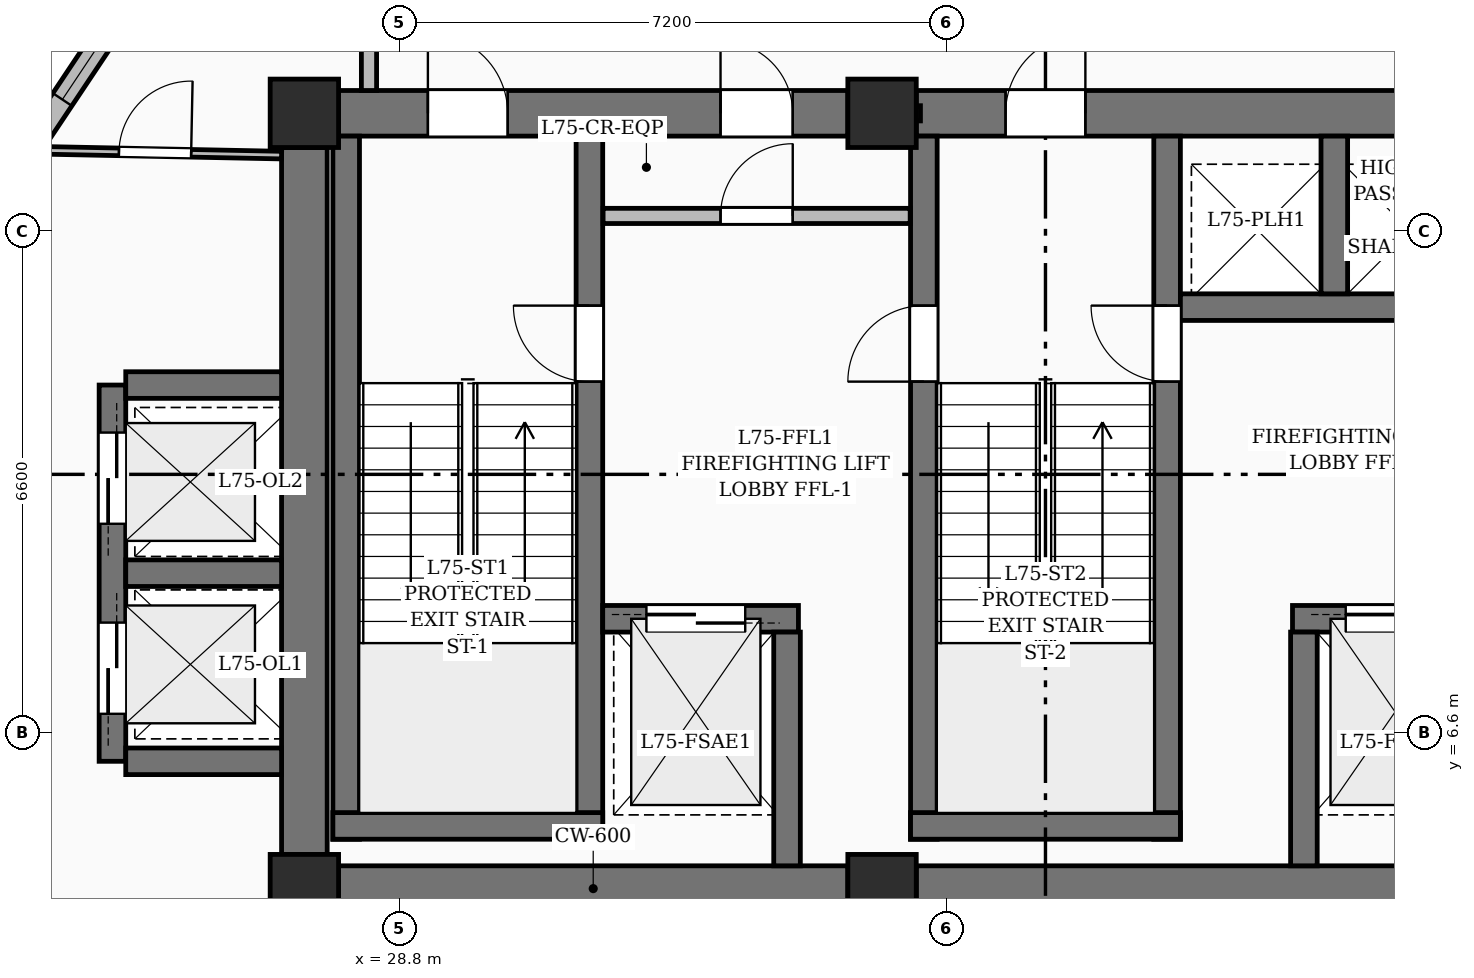
"""IFC4 building model, lengths in metres.
Left out: names, types, materials, properties, quantities, classifications, styles, units other than length and angle.
Written with IfcOpenShell. Run it as: python <this file> out.ifc"""

import sys

from ifc_helpers import new_model, si_unit, direction, frame, frame_2d, origin, origin_2d, place, context, subcontext, project, spatial, rectangle, extrude, element, fill, save


model = new_model("IFC4")
c1 = context("Model", 3, precision=1e-05, world=origin(), true_north=direction((0.0, 1.0)))
c2 = subcontext(c1, "Body", "Model", "MODEL_VIEW")
j1 = project(units=[si_unit("LENGTHUNIT", "METRE"), si_unit("PLANEANGLEUNIT", "RADIAN")], contexts=[c1])
p1 = place(None, origin())
s1 = spatial("IfcSite", under=j1, at=p1, CompositionType="ELEMENT")
p2 = place(p1, origin())
s2 = spatial("IfcBuilding", under=s1, at=p2, CompositionType="ELEMENT")
p3 = place(p2, frame((0.0, 0.0, 289.5)))
s3 = spatial("IfcBuildingStorey", under=s2, at=p3, CompositionType="ELEMENT", Elevation=289.5)
for number, where, z_axis, x_axis in (
    (1, (27.55, 4.55, 0.0), (0.0, 0.0, 1.0), (1.0, 0.0, 0.0)),
    (2, (35.15, 4.55, 0.0), (0.0, 0.0, 1.0), (1.0, 0.0, 0.0)),
    (3, (27.55, 14.75, 0.0), (0.0, 0.0, 1.0), (1.0, 0.0, 0.0)),
    (4, (35.15, 14.75, 0.0), (0.0, 0.0, 1.0), (1.0, 0.0, 0.0)),
):
    element("IfcColumn", number, at=place(p3, frame(where, z_axis=z_axis, x_axis=x_axis)), inside=s3, PredefinedType="COLUMN", context=c2, shape_type="SweptSolid", body=[
        extrude(rectangle(XDim=0.9, YDim=0.9, at=origin_2d()), origin(), (0.0, 0.0, 1.0), 4.5),
    ])
p4 = place(p3, frame((28.0, 4.55, 0.0), z_axis=(0.0, 0.0, 1.0), x_axis=(1.0, 0.0, 0.0)))
e5 = element("IfcWall", 5, at=p4, inside=s3, PredefinedType="SHEAR", context=c2, shape_type="SweptSolid", body=[
    extrude(rectangle(XDim=6.7, YDim=0.6, at=frame_2d((3.35, 0.0))), origin(), (0.0, 0.0, 1.0), 4.5),
])
p5 = place(p3, frame((35.6, 4.55, 0.0), z_axis=(0.0, 0.0, 1.0), x_axis=(1.0, 0.0, 0.0)))
e6 = element("IfcWall", 6, at=p5, inside=s3, PredefinedType="SHEAR", context=c2, shape_type="SweptSolid", body=[
    extrude(rectangle(XDim=11.0, YDim=0.6, at=frame_2d((5.5, 0.0))), origin(), (0.0, 0.0, 1.0), 4.5),
])
p6 = place(p3, frame((28.0, 14.75, 0.0), z_axis=(0.0, 0.0, 1.0), x_axis=(1.0, 0.0, 0.0)))
e7 = element("IfcWall", 7, at=p6, inside=s3, PredefinedType="SHEAR", context=c2, shape_type="SweptSolid", body=[
    extrude(rectangle(XDim=6.7, YDim=0.6, at=frame_2d((3.35, 0.0))), origin(), (0.0, 0.0, 1.0), 4.5),
])
p7 = place(p6, frame((1.175, 0.0, 0.0)))
e8 = element("IfcOpeningElement", 8, at=p7, cuts=e7, PredefinedType="OPENING", context=c2, shape_type="SweptSolid", body=[
    extrude(rectangle(XDim=1.05, YDim=2.15, at=frame_2d((0.525, 1.075))), frame((0.0, 0.31, 0.0), z_axis=(0.0, -1.0, 0.0), x_axis=(1.0, 0.0, 0.0)), (0.0, 0.0, 1.0), 0.62),
])
p8 = place(p6, frame((5.025, 0.0, 0.0)))
e9 = element("IfcOpeningElement", 9, at=p8, cuts=e7, PredefinedType="OPENING", context=c2, shape_type="SweptSolid", body=[
    extrude(rectangle(XDim=0.95, YDim=2.15, at=frame_2d((0.475, 1.075))), frame((0.0, 0.31, 0.0), z_axis=(0.0, -1.0, 0.0), x_axis=(1.0, 0.0, 0.0)), (0.0, 0.0, 1.0), 0.62),
])
p9 = place(p3, frame((35.6, 14.75, 0.0), z_axis=(0.0, 0.0, 1.0), x_axis=(1.0, 0.0, 0.0)))
e10 = element("IfcWall", 10, at=p9, inside=s3, PredefinedType="SHEAR", context=c2, shape_type="SweptSolid", body=[
    extrude(rectangle(XDim=11.0, YDim=0.6, at=frame_2d((5.5, 0.0))), origin(), (0.0, 0.0, 1.0), 4.5),
])
p10 = place(p9, frame((1.175, 0.0, 0.0)))
e11 = element("IfcOpeningElement", 11, at=p10, cuts=e10, PredefinedType="OPENING", context=c2, shape_type="SweptSolid", body=[
    extrude(rectangle(XDim=1.05, YDim=2.15, at=frame_2d((0.525, 1.075))), frame((0.0, 0.31, 0.0), z_axis=(0.0, -1.0, 0.0), x_axis=(1.0, 0.0, 0.0)), (0.0, 0.0, 1.0), 0.62),
])
p11 = place(p9, frame((8.775, 0.0, 0.0)))
e12 = element("IfcOpeningElement", 12, at=p11, cuts=e10, PredefinedType="OPENING", context=c2, shape_type="SweptSolid", body=[
    extrude(rectangle(XDim=1.05, YDim=2.15, at=frame_2d((0.525, 1.075))), frame((0.0, 0.31, 0.0), z_axis=(0.0, -1.0, 0.0), x_axis=(1.0, 0.0, 0.0)), (0.0, 0.0, 1.0), 0.62),
])
p12 = place(p3, frame((27.55, 5.0, 0.0), z_axis=(0.0, 0.0, 1.0), x_axis=(0.0, 1.0, 0.0)))
e13 = element("IfcWall", 13, at=p12, inside=s3, PredefinedType="SHEAR", context=c2, shape_type="SweptSolid", body=[
    extrude(rectangle(XDim=9.3, YDim=0.6, at=frame_2d((4.65, 0.0))), origin(), (0.0, 0.0, 1.0), 4.5),
])
p13 = place(p3, frame((28.1, 5.2, 0.0), z_axis=(0.0, 0.0, 1.0), x_axis=(0.0, 1.0, 0.0)))
e14 = element("IfcWall", 14, at=p13, inside=s3, PredefinedType="SOLIDWALL", context=c2, shape_type="SweptSolid", body=[
    extrude(rectangle(XDim=9.25, YDim=0.35, at=frame_2d((4.625, 0.0))), origin(), (0.0, 0.0, 1.0), 4.5),
])
p14 = place(p3, frame((31.3, 5.2, 0.0), z_axis=(0.0, 0.0, 1.0), x_axis=(0.0, 1.0, 0.0)))
e15 = element("IfcWall", 15, at=p14, inside=s3, PredefinedType="SOLIDWALL", context=c2, shape_type="SweptSolid", body=[
    extrude(rectangle(XDim=9.25, YDim=0.35, at=frame_2d((4.625, 0.0))), origin(), (0.0, 0.0, 1.0), 4.5),
])
p15 = place(p14, frame((6.02, 0.0, 0.0)))
e16 = element("IfcOpeningElement", 16, at=p15, cuts=e15, PredefinedType="OPENING", context=c2, shape_type="SweptSolid", body=[
    extrude(rectangle(XDim=1.0, YDim=2.15, at=frame_2d((0.5, 1.075))), frame((0.0, 0.185, 0.0), z_axis=(0.0, -1.0, 0.0), x_axis=(1.0, 0.0, 0.0)), (0.0, 0.0, 1.0), 0.37),
])
p16 = place(p3, frame((27.925, 5.375, 0.0), z_axis=(0.0, 0.0, 1.0), x_axis=(1.0, 0.0, 0.0)))
e17 = element("IfcWall", 17, at=p16, inside=s3, PredefinedType="SOLIDWALL", context=c2, shape_type="SweptSolid", body=[
    extrude(rectangle(XDim=3.55, YDim=0.35, at=frame_2d((1.775, 0.0))), origin(), (0.0, 0.0, 1.0), 4.5),
])
p17 = place(p3, frame((35.7, 5.2, 0.0), z_axis=(0.0, 0.0, 1.0), x_axis=(0.0, 1.0, 0.0)))
e18 = element("IfcWall", 18, at=p17, inside=s3, PredefinedType="SOLIDWALL", context=c2, shape_type="SweptSolid", body=[
    extrude(rectangle(XDim=9.25, YDim=0.35, at=frame_2d((4.625, 0.0))), origin(), (0.0, 0.0, 1.0), 4.5),
])
p18 = place(p17, frame((6.02, 0.0, 0.0)))
e19 = element("IfcOpeningElement", 19, at=p18, cuts=e18, PredefinedType="OPENING", context=c2, shape_type="SweptSolid", body=[
    extrude(rectangle(XDim=1.0, YDim=2.15, at=frame_2d((0.5, 1.075))), frame((0.0, 0.185, 0.0), z_axis=(0.0, -1.0, 0.0), x_axis=(1.0, 0.0, 0.0)), (0.0, 0.0, 1.0), 0.37),
])
p19 = place(p3, frame((38.9, 5.2, 0.0), z_axis=(0.0, 0.0, 1.0), x_axis=(0.0, 1.0, 0.0)))
e20 = element("IfcWall", 20, at=p19, inside=s3, PredefinedType="SOLIDWALL", context=c2, shape_type="SweptSolid", body=[
    extrude(rectangle(XDim=9.25, YDim=0.35, at=frame_2d((4.625, 0.0))), origin(), (0.0, 0.0, 1.0), 4.5),
])
p20 = place(p19, frame((6.02, 0.0, 0.0)))
e21 = element("IfcOpeningElement", 21, at=p20, cuts=e20, PredefinedType="OPENING", context=c2, shape_type="SweptSolid", body=[
    extrude(rectangle(XDim=1.0, YDim=2.15, at=frame_2d((0.5, 1.075))), frame((0.0, 0.185, 0.0), z_axis=(0.0, -1.0, 0.0), x_axis=(1.0, 0.0, 0.0)), (0.0, 0.0, 1.0), 0.37),
])
p21 = place(p3, frame((35.525, 5.375, 0.0), z_axis=(0.0, 0.0, 1.0), x_axis=(1.0, 0.0, 0.0)))
e22 = element("IfcWall", 22, at=p21, inside=s3, PredefinedType="SOLIDWALL", context=c2, shape_type="SweptSolid", body=[
    extrude(rectangle(XDim=3.55, YDim=0.35, at=frame_2d((1.775, 0.0))), origin(), (0.0, 0.0, 1.0), 4.5),
])
p22 = place(p3, frame((31.475, 8.1, 0.0), z_axis=(0.0, 0.0, 1.0), x_axis=(1.0, 0.0, 0.0)))
e23 = element("IfcWall", 23, at=p22, inside=s3, PredefinedType="SOLIDWALL", context=c2, shape_type="SweptSolid", body=[
    extrude(rectangle(XDim=2.575, YDim=0.35, at=frame_2d((1.288, 0.0))), origin(), (0.0, 0.0, 1.0), 4.5),
])
p23 = place(p22, frame((0.575, 0.0, 0.0)))
e24 = element("IfcOpeningElement", 24, at=p23, cuts=e23, PredefinedType="OPENING", context=c2, shape_type="SweptSolid", body=[
    extrude(rectangle(XDim=1.3, YDim=2.25, at=frame_2d((0.65, 1.125))), frame((0.0, 0.185, 0.0), z_axis=(0.0, -1.0, 0.0), x_axis=(1.0, 0.0, 0.0)), (0.0, 0.0, 1.0), 0.37),
])
p24 = place(p3, frame((40.55, 8.1, 0.0), z_axis=(0.0, 0.0, 1.0), x_axis=(1.0, 0.0, 0.0)))
e25 = element("IfcWall", 25, at=p24, inside=s3, PredefinedType="SOLIDWALL", context=c2, shape_type="SweptSolid", body=[
    extrude(rectangle(XDim=2.575, YDim=0.35, at=frame_2d((1.288, 0.0))), origin(), (0.0, 0.0, 1.0), 4.5),
])
p25 = place(p24, frame((0.7, 0.0, 0.0)))
e26 = element("IfcOpeningElement", 26, at=p25, cuts=e25, PredefinedType="OPENING", context=c2, shape_type="SweptSolid", body=[
    extrude(rectangle(XDim=1.3, YDim=2.25, at=frame_2d((0.65, 1.125))), frame((0.0, 0.185, 0.0), z_axis=(0.0, -1.0, 0.0), x_axis=(1.0, 0.0, 0.0)), (0.0, 0.0, 1.0), 0.37),
])
for number, where, z_axis, x_axis in (
    (27, (33.9, 4.85, 0.0), (0.0, 0.0, 1.0), (0.0, 1.0, 0.0)),
    (28, (40.7, 4.85, 0.0), (0.0, 0.0, 1.0), (0.0, 1.0, 0.0)),
):
    element("IfcWall", number, at=place(p3, frame(where, z_axis=z_axis, x_axis=x_axis)), inside=s3, PredefinedType="SOLIDWALL", context=c2, shape_type="SweptSolid", body=[
        extrude(rectangle(XDim=3.075, YDim=0.35, at=frame_2d((1.538, 0.0))), origin(), (0.0, 0.0, 1.0), 4.5),
    ])
p26 = place(p3, frame((39.075, 12.2, 0.0), z_axis=(0.0, 0.0, 1.0), x_axis=(1.0, 0.0, 0.0)))
e29 = element("IfcWall", 29, at=p26, inside=s3, PredefinedType="SOLIDWALL", context=c2, shape_type="SweptSolid", body=[
    extrude(rectangle(XDim=4.05, YDim=0.35, at=frame_2d((2.025, 0.0))), origin(), (0.0, 0.0, 1.0), 4.5),
])
p27 = place(p3, frame((41.1, 12.375, 0.0), z_axis=(0.0, 0.0, 1.0), x_axis=(0.0, 1.0, 0.0)))
e30 = element("IfcWall", 30, at=p27, inside=s3, PredefinedType="SOLIDWALL", context=c2, shape_type="SweptSolid", body=[
    extrude(rectangle(XDim=2.075, YDim=0.35, at=frame_2d((1.038, 0.0))), origin(), (0.0, 0.0, 1.0), 4.5),
])
p28 = place(p3, frame((25.025, 6.225, 0.0), z_axis=(0.0, 0.0, 1.0), x_axis=(0.0, 1.0, 0.0)))
e31 = element("IfcWall", 31, at=p28, inside=s3, PredefinedType="SOLIDWALL", context=c2, shape_type="SweptSolid", body=[
    extrude(rectangle(XDim=4.95, YDim=0.35, at=frame_2d((2.475, 0.0))), origin(), (0.0, 0.0, 1.0), 4.5),
])
p29 = place(p28, frame((0.625, 0.0, 0.0)))
e32 = element("IfcOpeningElement", 32, at=p29, cuts=e31, PredefinedType="OPENING", context=c2, shape_type="SweptSolid", body=[
    extrude(rectangle(XDim=1.2, YDim=2.2, at=frame_2d((0.6, 1.1))), frame((0.0, 0.185, 0.0), z_axis=(0.0, -1.0, 0.0), x_axis=(1.0, 0.0, 0.0)), (0.0, 0.0, 1.0), 0.37),
])
p30 = place(p28, frame((3.125, 0.0, 0.0)))
e33 = element("IfcOpeningElement", 33, at=p30, cuts=e31, PredefinedType="OPENING", context=c2, shape_type="SweptSolid", body=[
    extrude(rectangle(XDim=1.2, YDim=2.2, at=frame_2d((0.6, 1.1))), frame((0.0, 0.185, 0.0), z_axis=(0.0, -1.0, 0.0), x_axis=(1.0, 0.0, 0.0)), (0.0, 0.0, 1.0), 0.37),
])
for number, where, z_axis, x_axis in (
    (34, (25.2, 6.225, 0.0), (0.0, 0.0, 1.0), (1.0, 0.0, 0.0)),
    (35, (25.2, 8.7, 0.0), (0.0, 0.0, 1.0), (1.0, 0.0, 0.0)),
    (36, (25.2, 11.175, 0.0), (0.0, 0.0, 1.0), (1.0, 0.0, 0.0)),
):
    element("IfcWall", number, at=place(p3, frame(where, z_axis=z_axis, x_axis=x_axis)), inside=s3, PredefinedType="SOLIDWALL", context=c2, shape_type="SweptSolid", body=[
        extrude(rectangle(XDim=2.05, YDim=0.35, at=frame_2d((1.025, 0.0))), origin(), (0.0, 0.0, 1.0), 4.5),
    ])
p31 = place(p3, frame((21.812, 11.105, 0.0), z_axis=(0.0, 0.0, 1.0), x_axis=(0.555222871335, 0.831701607036, 0.0)))
e37 = element("IfcWall", 37, at=p31, inside=s3, PredefinedType="SOLIDWALL", context=c2, shape_type="SweptSolid", body=[
    extrude(rectangle(XDim=7.328, YDim=0.3, at=frame_2d((3.664, 0.0))), origin(), (0.0, 0.0, 1.0), 4.2),
])
p32 = place(p31, frame((4.6, 0.0, 0.55)))
e38 = element("IfcOpeningElement", 38, at=p32, cuts=e37, PredefinedType="OPENING", context=c2, shape_type="SweptSolid", body=[
    extrude(rectangle(XDim=2.1, YDim=2.4, at=frame_2d((1.05, 1.2))), frame((0.0, 0.16, 0.0), z_axis=(0.0, -1.0, 0.0), x_axis=(1.0, 0.0, 0.0)), (0.0, 0.0, 1.0), 0.32),
])
p33 = place(p3, frame((34.72, 14.75, 0.0), z_axis=(0.0, 0.0, 1.0), x_axis=(1.0, 0.0, 0.0)))
e39 = element("IfcWall", 39, at=p33, inside=s3, PredefinedType="PARTITIONING", context=c2, shape_type="SweptSolid", body=[
    extrude(rectangle(XDim=0.935, YDim=0.2, at=frame_2d((0.468, 0.0))), origin(), (0.0, 0.0, 1.0), 3.385),
])
p34 = place(p3, frame((31.48, 13.4, 0.0), z_axis=(0.0, 0.0, 1.0), x_axis=(1.0, 0.0, 0.0)))
e40 = element("IfcWall", 40, at=p34, inside=s3, PredefinedType="PARTITIONING", context=c2, shape_type="SweptSolid", body=[
    extrude(rectangle(XDim=4.04, YDim=0.2, at=frame_2d((2.02, 0.0))), origin(), (0.0, 0.0, 1.0), 4.2),
])
p35 = place(p34, frame((1.545, 0.0, 0.0)))
e41 = element("IfcOpeningElement", 41, at=p35, cuts=e40, PredefinedType="OPENING", context=c2, shape_type="SweptSolid", body=[
    extrude(rectangle(XDim=0.95, YDim=2.15, at=frame_2d((0.475, 1.075))), frame((0.0, 0.11, 0.0), z_axis=(0.0, -1.0, 0.0), x_axis=(1.0, 0.0, 0.0)), (0.0, 0.0, 1.0), 0.22),
])
p36 = place(p3, frame((28.4, 15.05, 0.0), z_axis=(0.0, 0.0, 1.0), x_axis=(0.0, 1.0, 0.0)))
e42 = element("IfcWall", 42, at=p36, inside=s3, PredefinedType="PARTITIONING", context=c2, shape_type="SweptSolid", body=[
    extrude(rectangle(XDim=2.3, YDim=0.2, at=frame_2d((1.15, 0.0))), origin(), (0.0, 0.0, 1.0), 3.535),
])
p37 = place(p3, frame((24.055, 14.264, 0.0), z_axis=(0.0, 0.0, 1.0), x_axis=(0.99979966268, -0.020015856317, 0.0)))
e43 = element("IfcWall", 43, at=p37, inside=s3, PredefinedType="PARTITIONING", context=c2, shape_type="SweptSolid", body=[
    extrude(rectangle(XDim=3.196, YDim=0.1, at=frame_2d((1.598, 0.0))), origin(), (0.0, 0.0, 1.0), 3.391),
])
p38 = place(p37, frame((1.056, 0.0, 0.0)))
e44 = element("IfcOpeningElement", 44, at=p38, cuts=e43, PredefinedType="OPENING", context=c2, shape_type="SweptSolid", body=[
    extrude(rectangle(XDim=0.95, YDim=2.2, at=frame_2d((0.475, 1.1))), frame((0.0, 0.06, 0.0), z_axis=(0.0, -1.0, 0.0), x_axis=(1.0, 0.0, 0.0)), (0.0, 0.0, 1.0), 0.12),
])
p39 = place(p32, origin())
e45 = element("IfcWindow", 45, at=p39, inside=s3, PartitioningType="SINGLE_PANEL", PredefinedType="WINDOW", context=c2, shape_type="SweptSolid", body=[
    extrude(rectangle(XDim=2.1, YDim=2.4, at=frame_2d((1.05, 1.2))), frame((0.0, 0.03, 0.0), z_axis=(0.0, -1.0, 0.0), x_axis=(1.0, 0.0, 0.0)), (0.0, 0.0, 1.0), 0.06),
])
fill(e38, e45)
p40 = place(p7, origin())
e46 = element("IfcDoor", 46, at=p40, inside=s3, OperationType="SINGLE_SWING_LEFT", PredefinedType="DOOR", context=c2, shape_type="SweptSolid", body=[
    extrude(rectangle(XDim=1.05, YDim=2.15, at=frame_2d((0.525, 1.075))), frame((0.0, 0.025, 0.0), z_axis=(0.0, -1.0, 0.0), x_axis=(1.0, 0.0, 0.0)), (0.0, 0.0, 1.0), 0.05),
])
fill(e8, e46)
p41 = place(p10, origin())
e47 = element("IfcDoor", 47, at=p41, inside=s3, OperationType="SINGLE_SWING_RIGHT", PredefinedType="DOOR", context=c2, shape_type="SweptSolid", body=[
    extrude(rectangle(XDim=1.05, YDim=2.15, at=frame_2d((0.525, 1.075))), frame((0.0, 0.025, 0.0), z_axis=(0.0, -1.0, 0.0), x_axis=(1.0, 0.0, 0.0)), (0.0, 0.0, 1.0), 0.05),
])
fill(e11, e47)
p42 = place(p15, origin())
e48 = element("IfcDoor", 48, at=p42, inside=s3, OperationType="SINGLE_SWING_RIGHT", PredefinedType="DOOR", context=c2, shape_type="SweptSolid", body=[
    extrude(rectangle(XDim=1.0, YDim=2.15, at=frame_2d((0.5, 1.075))), frame((0.0, 0.025, 0.0), z_axis=(0.0, -1.0, 0.0), x_axis=(1.0, 0.0, 0.0)), (0.0, 0.0, 1.0), 0.05),
])
fill(e16, e48)
p43 = place(p18, origin())
e49 = element("IfcDoor", 49, at=p43, inside=s3, OperationType="SINGLE_SWING_LEFT", PredefinedType="DOOR", context=c2, shape_type="SweptSolid", body=[
    extrude(rectangle(XDim=1.0, YDim=2.15, at=frame_2d((0.5, 1.075))), frame((0.0, 0.025, 0.0), z_axis=(0.0, -1.0, 0.0), x_axis=(1.0, 0.0, 0.0)), (0.0, 0.0, 1.0), 0.05),
])
fill(e19, e49)
p44 = place(p20, origin())
e50 = element("IfcDoor", 50, at=p44, inside=s3, OperationType="SINGLE_SWING_RIGHT", PredefinedType="DOOR", context=c2, shape_type="SweptSolid", body=[
    extrude(rectangle(XDim=1.0, YDim=2.15, at=frame_2d((0.5, 1.075))), frame((0.0, 0.025, 0.0), z_axis=(0.0, -1.0, 0.0), x_axis=(1.0, 0.0, 0.0)), (0.0, 0.0, 1.0), 0.05),
])
fill(e21, e50)
p45 = place(p23, origin())
e51 = element("IfcDoor", 51, at=p45, inside=s3, OperationType="DOUBLE_DOOR_SLIDING", PredefinedType="DOOR", context=c2, shape_type="SweptSolid", body=[
    extrude(rectangle(XDim=1.3, YDim=2.25, at=frame_2d((0.65, 1.125))), frame((0.0, 0.025, 0.0), z_axis=(0.0, -1.0, 0.0), x_axis=(1.0, 0.0, 0.0)), (0.0, 0.0, 1.0), 0.05),
])
fill(e24, e51)
p46 = place(p25, origin())
e52 = element("IfcDoor", 52, at=p46, inside=s3, OperationType="DOUBLE_DOOR_SLIDING", PredefinedType="DOOR", context=c2, shape_type="SweptSolid", body=[
    extrude(rectangle(XDim=1.3, YDim=2.25, at=frame_2d((0.65, 1.125))), frame((0.0, 0.025, 0.0), z_axis=(0.0, -1.0, 0.0), x_axis=(1.0, 0.0, 0.0)), (0.0, 0.0, 1.0), 0.05),
])
fill(e26, e52)
p47 = place(p29, origin())
e53 = element("IfcDoor", 53, at=p47, inside=s3, OperationType="DOUBLE_DOOR_SLIDING", PredefinedType="DOOR", context=c2, shape_type="SweptSolid", body=[
    extrude(rectangle(XDim=1.2, YDim=2.2, at=frame_2d((0.6, 1.1))), frame((0.0, 0.025, 0.0), z_axis=(0.0, -1.0, 0.0), x_axis=(1.0, 0.0, 0.0)), (0.0, 0.0, 1.0), 0.05),
])
fill(e32, e53)
p48 = place(p30, origin())
e54 = element("IfcDoor", 54, at=p48, inside=s3, OperationType="DOUBLE_DOOR_SLIDING", PredefinedType="DOOR", context=c2, shape_type="SweptSolid", body=[
    extrude(rectangle(XDim=1.2, YDim=2.2, at=frame_2d((0.6, 1.1))), frame((0.0, 0.025, 0.0), z_axis=(0.0, -1.0, 0.0), x_axis=(1.0, 0.0, 0.0)), (0.0, 0.0, 1.0), 0.05),
])
fill(e33, e54)
p49 = place(p35, origin())
e55 = element("IfcDoor", 55, at=p49, inside=s3, OperationType="SINGLE_SWING_RIGHT", PredefinedType="DOOR", context=c2, shape_type="SweptSolid", body=[
    extrude(rectangle(XDim=0.95, YDim=2.15, at=frame_2d((0.475, 1.075))), frame((0.0, 0.025, 0.0), z_axis=(0.0, -1.0, 0.0), x_axis=(1.0, 0.0, 0.0)), (0.0, 0.0, 1.0), 0.05),
])
fill(e41, e55)
p50 = place(p8, origin())
e56 = element("IfcDoor", 56, at=p50, inside=s3, OperationType="SINGLE_SWING_LEFT", PredefinedType="DOOR", context=c2, shape_type="SweptSolid", body=[
    extrude(rectangle(XDim=0.95, YDim=2.15, at=frame_2d((0.475, 1.075))), frame((0.0, 0.025, 0.0), z_axis=(0.0, -1.0, 0.0), x_axis=(1.0, 0.0, 0.0)), (0.0, 0.0, 1.0), 0.05),
])
fill(e9, e56)
p51 = place(p38, origin())
e57 = element("IfcDoor", 57, at=p51, inside=s3, OperationType="SINGLE_SWING_RIGHT", PredefinedType="DOOR", context=c2, shape_type="SweptSolid", body=[
    extrude(rectangle(XDim=0.95, YDim=2.2, at=frame_2d((0.475, 1.1))), frame((0.0, 0.025, 0.0), z_axis=(0.0, -1.0, 0.0), x_axis=(1.0, 0.0, 0.0)), (0.0, 0.0, 1.0), 0.05),
])
fill(e44, e57)
save(model, sys.argv[1])
